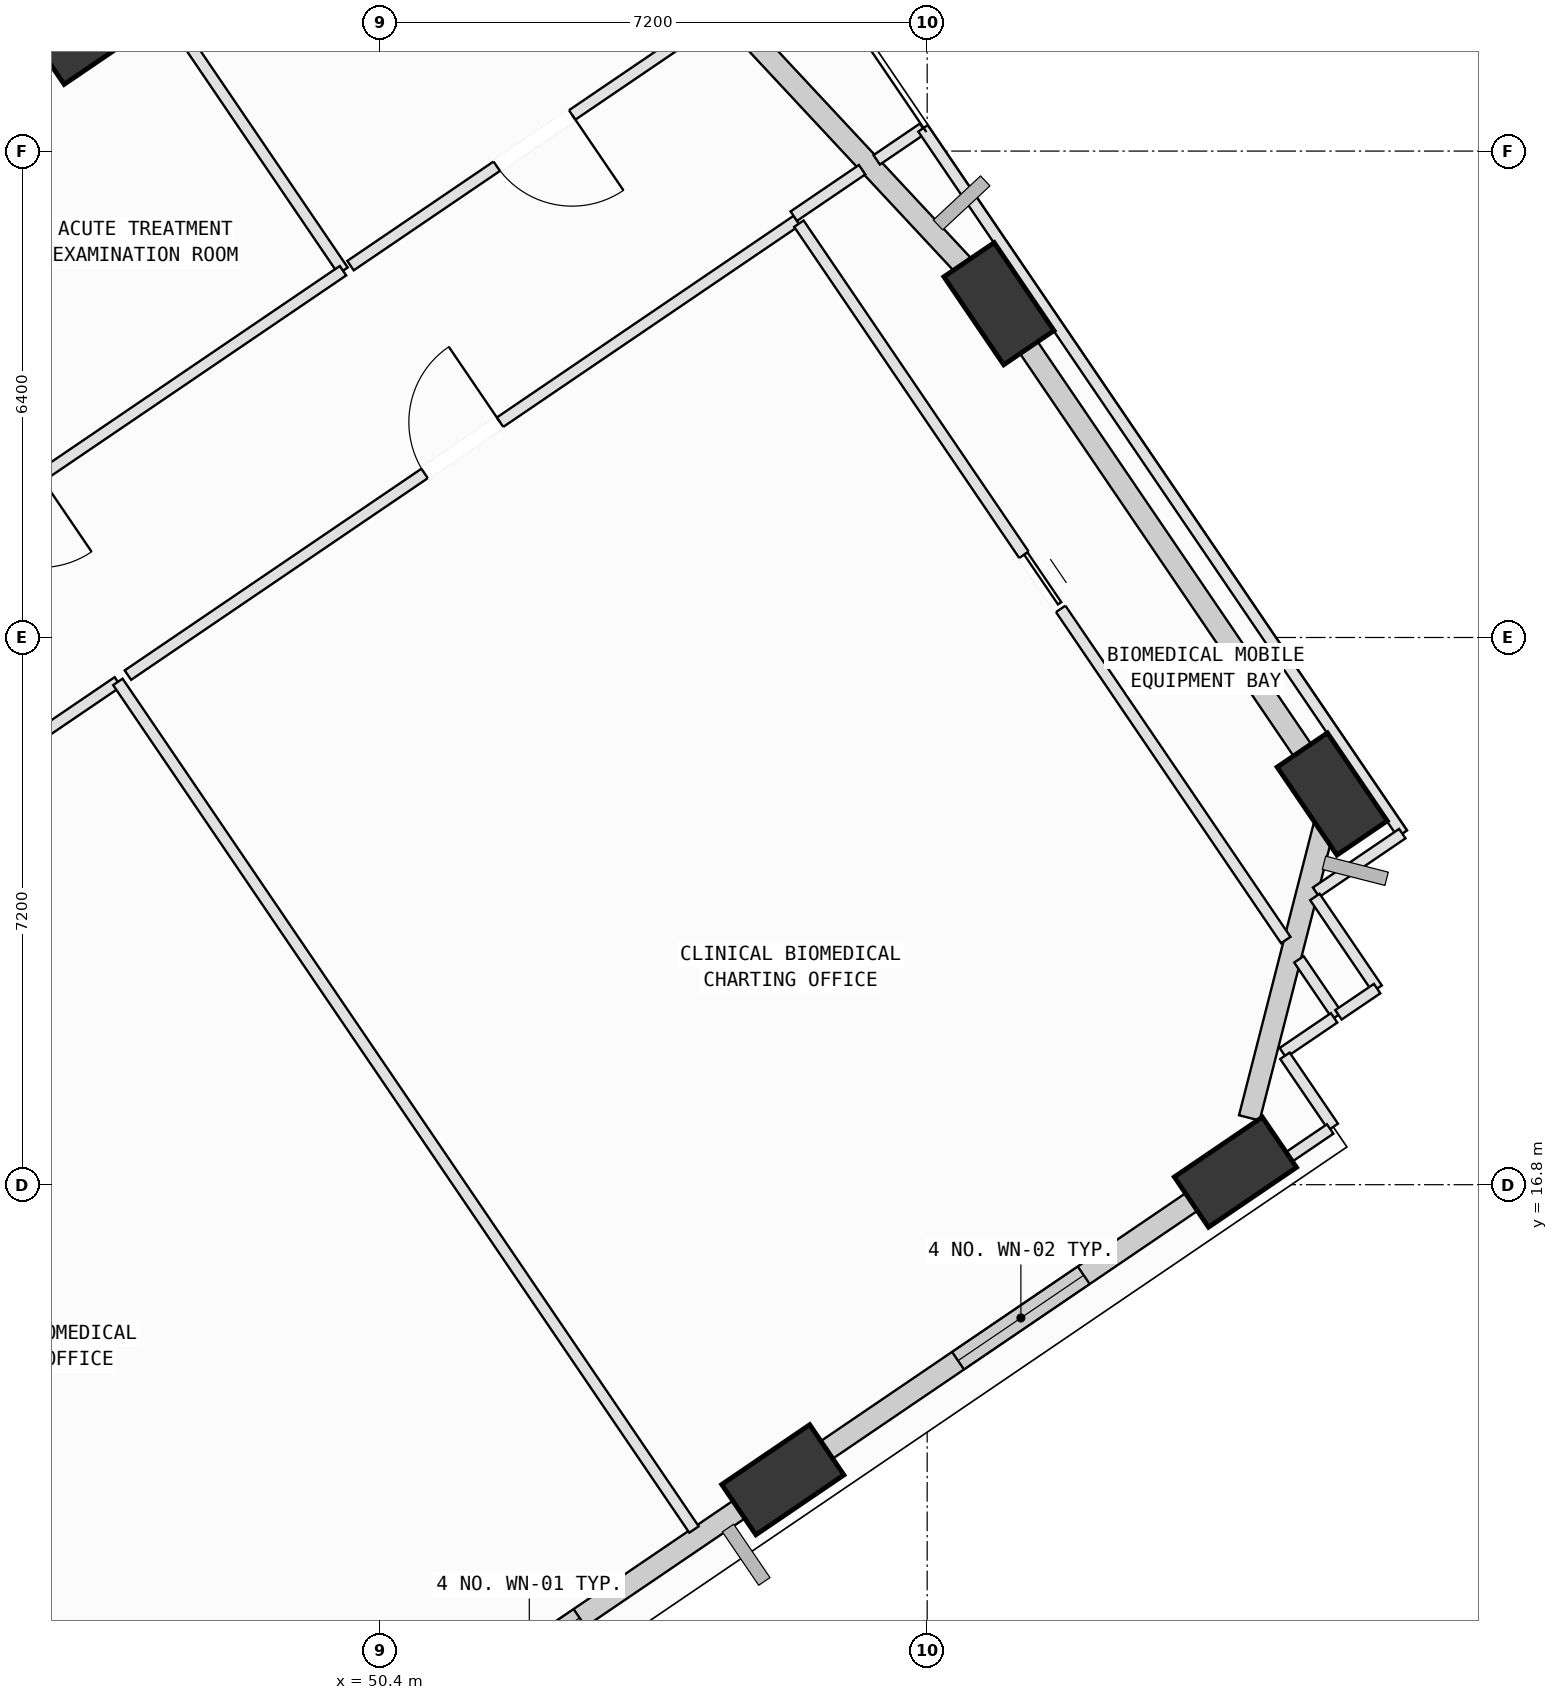
"""IFC4 building model, lengths in metres.
Left out: names, types, materials, properties, quantities, classifications, styles, units other than length and angle.
Written with IfcOpenShell. Run it as: python <this file> out.ifc"""

import sys

from ifc_helpers import new_model, si_unit, direction, frame, frame_2d, origin, origin_2d, place, context, subcontext, project, spatial, rectangle, extrude, element, fill, save


model = new_model("IFC4")
c1 = context("Model", 3, precision=1e-05, world=origin(), true_north=direction((0.0, 1.0)))
c2 = subcontext(c1, "Body", "Model", "MODEL_VIEW")
j1 = project(units=[si_unit("LENGTHUNIT", "METRE"), si_unit("PLANEANGLEUNIT", "RADIAN")], contexts=[c1])
p1 = place(None, origin())
s1 = spatial("IfcSite", under=j1, at=p1, CompositionType="ELEMENT")
p2 = place(p1, origin())
s2 = spatial("IfcBuilding", under=s1, at=p2, CompositionType="ELEMENT")
p3 = place(p2, frame((0.0, 0.0, 169.8)))
s3 = spatial("IfcBuildingStorey", under=s2, at=p3, CompositionType="ELEMENT", Elevation=169.8)
p4 = place(p3, frame((55.701, 12.918, 0.002), z_axis=(0.048185452989, 0.091509826232, 0.994637679672), x_axis=(-0.992304167362, -0.109330716198, 0.058131178649)))
e1 = element("IfcColumn", 1, at=p4, inside=s3, PredefinedType="COLUMN", context=c2, shape_type="SweptSolid", body=[
    extrude(rectangle(XDim=1.4, YDim=0.8, at=origin_2d()), origin(), (0.0, 0.0, 1.0), 4.018),
])
p5 = place(p3, frame((61.656, 16.965, 0.002), z_axis=(0.031295675445, 0.115721218507, 0.992788587911), x_axis=(-0.944079501124, -0.322759370879, 0.067381630046)))
e2 = element("IfcColumn", 2, at=p5, inside=s3, PredefinedType="COLUMN", context=c2, shape_type="SweptSolid", body=[
    extrude(rectangle(XDim=1.4, YDim=0.8, at=origin_2d()), origin(), (0.0, 0.0, 1.0), 4.025),
])
p6 = place(p3, frame((62.929, 21.941, 0.002), z_axis=(0.010733315165, 0.120795275761, 0.992619412111), x_axis=(0.487215616572, -0.867502531663, 0.10030104948)))
e3 = element("IfcColumn", 3, at=p6, inside=s3, PredefinedType="COLUMN", context=c2, shape_type="SweptSolid", body=[
    extrude(rectangle(XDim=1.4, YDim=0.8, at=origin_2d()), origin(), (0.0, 0.0, 1.0), 4.026),
])
p7 = place(p3, frame((58.544, 28.392, 0.002), z_axis=(-0.015676138323, 0.102745542265, 0.994584140348), x_axis=(0.679723744702, -0.728413429944, 0.0859622357)))
e4 = element("IfcColumn", 4, at=p7, inside=s3, PredefinedType="COLUMN", context=c2, shape_type="SweptSolid", body=[
    extrude(rectangle(XDim=1.4, YDim=0.8, at=origin_2d()), origin(), (0.0, 0.0, 1.0), 4.018),
])
p8 = place(p3, frame((46.6, 32.002, 0.002), z_axis=(-0.030243842786, 0.05353647977, 0.998107787419), x_axis=(-0.444173384938, -0.895273976304, 0.034561705191)))
e5 = element("IfcColumn", 5, at=p8, inside=s3, PredefinedType="COLUMN", context=c2, shape_type="SweptSolid", body=[
    extrude(rectangle(XDim=1.4, YDim=0.8, at=origin_2d()), origin(), (0.0, 0.0, 1.0), 4.004),
])
p9 = place(p3, frame((55.45, 12.747, 0.0), z_axis=(0.0, 0.0, 1.0), x_axis=(-0.827088583616, -0.562071592284, 0.0)))
e6 = element("IfcWall", 6, at=p9, inside=s3, PredefinedType="SOLIDWALL", context=c2, shape_type="SweptSolid", body=[
    extrude(rectangle(XDim=6.218, YDim=0.28, at=frame_2d((3.109, 0.0))), origin(), (0.0, 0.0, 1.0), 3.165),
])
p10 = place(p9, frame((2.93, 0.0, 0.75)))
e7 = element("IfcOpeningElement", 7, at=p10, cuts=e6, PredefinedType="OPENING", context=c2, shape_type="SweptSolid", body=[
    extrude(rectangle(XDim=1.6, YDim=1.95, at=frame_2d((0.8, 0.975))), frame((0.0, 0.15, 0.0), z_axis=(0.0, -1.0, 0.0), x_axis=(1.0, 0.0, 0.0)), (0.0, 0.0, 1.0), 0.3),
])
p11 = place(p3, frame((61.418, 16.803, 0.0), z_axis=(0.0, 0.0, 1.0), x_axis=(-0.827071235127, -0.562097119745, 0.0)))
e8 = element("IfcWall", 8, at=p11, inside=s3, PredefinedType="SOLIDWALL", context=c2, shape_type="SweptSolid", body=[
    extrude(rectangle(XDim=6.242, YDim=0.28, at=frame_2d((3.121, 0.0))), origin(), (0.0, 0.0, 1.0), 3.165),
])
p12 = place(p11, frame((2.125, 0.0, 0.75)))
e9 = element("IfcOpeningElement", 9, at=p12, cuts=e8, PredefinedType="OPENING", context=c2, shape_type="SweptSolid", body=[
    extrude(rectangle(XDim=2.0, YDim=1.95, at=frame_2d((1.0, 0.975))), frame((0.0, 0.15, 0.0), z_axis=(0.0, -1.0, 0.0), x_axis=(1.0, 0.0, 0.0)), (0.0, 0.0, 1.0), 0.3),
])
p13 = place(p3, frame((62.866, 21.695, 0.0), z_axis=(0.0, 0.0, 1.0), x_axis=(-0.247839677851, -0.968801060116, 0.0)))
e10 = element("IfcWall", 10, at=p13, inside=s3, PredefinedType="SOLIDWALL", context=c2, shape_type="SweptSolid", body=[
    extrude(rectangle(XDim=4.145, YDim=0.28, at=frame_2d((2.073, 0.0))), origin(), (0.0, 0.0, 1.0), 3.165),
])
p14 = place(p3, frame((58.713, 28.144, 0.0), z_axis=(0.0, 0.0, 1.0), x_axis=(0.562091314576, -0.827075180427, 0.0)))
e11 = element("IfcWall", 11, at=p14, inside=s3, PredefinedType="SOLIDWALL", context=c2, shape_type="SweptSolid", body=[
    extrude(rectangle(XDim=6.84, YDim=0.28, at=frame_2d((3.42, 0.0))), origin(), (0.0, 0.0, 1.0), 3.165),
])
p15 = place(p3, frame((52.072, 35.335, 0.0), z_axis=(0.0, 0.0, 1.0), x_axis=(0.681878154304, -0.731465776837, 0.0)))
e12 = element("IfcWall", 12, at=p15, inside=s3, PredefinedType="SOLIDWALL", context=c2, shape_type="SweptSolid", body=[
    extrude(rectangle(XDim=8.838, YDim=0.28, at=frame_2d((4.419, 0.0))), origin(), (0.0, 0.0, 1.0), 3.165),
])
p16 = place(p3, frame((44.658, 30.683, 0.0), z_axis=(0.0, 0.0, 1.0), x_axis=(0.82709578115, 0.562061000964, 0.0)))
e13 = element("IfcWall", 13, at=p16, inside=s3, PredefinedType="SOLIDWALL", context=c2, shape_type="SweptSolid", body=[
    extrude(rectangle(XDim=1.877, YDim=0.28, at=frame_2d((0.939, 0.0))), origin(), (0.0, 0.0, 1.0), 3.065),
])
p17 = place(p3, frame((41.23, 19.527, 0.0), z_axis=(0.0, 0.0, 1.0), x_axis=(0.827060374775, 0.562113099364, 0.0)))
e14 = element("IfcWall", 14, at=p17, inside=s3, PredefinedType="PARTITIONING", context=c2, shape_type="SweptSolid", body=[
    extrude(rectangle(XDim=6.918, YDim=0.15, at=frame_2d((3.459, 0.0))), origin(), (0.0, 0.0, 1.0), 3.065),
])
p18 = place(p17, frame((2.859, 0.0, 0.0)))
e15 = element("IfcOpeningElement", 15, at=p18, cuts=e14, PredefinedType="OPENING", context=c2, shape_type="SweptSolid", body=[
    extrude(rectangle(XDim=1.2, YDim=2.15, at=frame_2d((0.6, 1.075))), frame((0.0, 0.085, 0.0), z_axis=(0.0, -1.0, 0.0), x_axis=(1.0, 0.0, 0.0)), (0.0, 0.0, 1.0), 0.17),
])
p19 = place(p3, frame((46.952, 23.416, 0.0), z_axis=(0.0, 0.0, 1.0), x_axis=(0.562106478049, -0.827064874926, 0.0)))
e16 = element("IfcWall", 16, at=p19, inside=s3, PredefinedType="PARTITIONING", context=c2, shape_type="SweptSolid", body=[
    extrude(rectangle(XDim=13.485, YDim=0.15, at=frame_2d((6.743, 0.0))), origin(), (0.0, 0.0, 1.0), 3.415),
])
p20 = place(p3, frame((47.084, 23.505, 0.0), z_axis=(0.0, 0.0, 1.0), x_axis=(0.827050244117, 0.562128004734, 0.0)))
e17 = element("IfcWall", 17, at=p20, inside=s3, PredefinedType="PARTITIONING", context=c2, shape_type="SweptSolid", body=[
    extrude(rectangle(XDim=10.64, YDim=0.15, at=frame_2d((5.32, 0.0))), origin(), (0.0, 0.0, 1.0), 3.78),
])
p21 = place(p20, frame((4.72, 0.0, 0.0)))
e18 = element("IfcOpeningElement", 18, at=p21, cuts=e17, PredefinedType="OPENING", context=c2, shape_type="SweptSolid", body=[
    extrude(rectangle(XDim=1.2, YDim=2.15, at=frame_2d((0.6, 1.075))), frame((0.0, 0.085, 0.0), z_axis=(0.0, -1.0, 0.0), x_axis=(1.0, 0.0, 0.0)), (0.0, 0.0, 1.0), 0.17),
])
p22 = place(p3, frame((55.912, 29.445, 0.0), z_axis=(0.0, 0.0, 1.0), x_axis=(0.562088516887, -0.827077081767, 0.0)))
e19 = element("IfcWall", 19, at=p22, inside=s3, PredefinedType="PARTITIONING", context=c2, shape_type="SweptSolid", body=[
    extrude(rectangle(XDim=11.397, YDim=0.15, at=frame_2d((5.698, 0.0))), origin(), (0.0, 0.0, 1.0), 3.78),
])
p23 = place(p22, frame((5.268, 0.0, 0.0)))
e20 = element("IfcOpeningElement", 20, at=p23, cuts=e19, PredefinedType="OPENING", context=c2, shape_type="SweptSolid", body=[
    extrude(rectangle(XDim=0.86, YDim=2.06, at=frame_2d((0.43, 1.03))), frame((0.0, 0.085, 0.0), z_axis=(0.0, -1.0, 0.0), x_axis=(1.0, 0.0, 0.0)), (0.0, 0.0, 1.0), 0.17),
])
p24 = place(p3, frame((62.491, 19.765, 0.0), z_axis=(0.0, 0.0, 1.0), x_axis=(0.562027100448, -0.82711881756, 0.0)))
e21 = element("IfcWall", 21, at=p24, inside=s3, PredefinedType="PARTITIONING", context=c2, shape_type="SweptSolid", body=[
    extrude(rectangle(XDim=0.897, YDim=0.15, at=frame_2d((0.448, 0.0))), origin(), (0.0, 0.0, 1.0), 3.78),
])
p25 = place(p3, frame((62.954, 18.995, 0.0), z_axis=(0.0, 0.0, 1.0), x_axis=(-0.82751053639, -0.561450186716, 0.0)))
e22 = element("IfcWall", 22, at=p25, inside=s3, PredefinedType="PARTITIONING", context=c2, shape_type="SweptSolid", body=[
    extrude(rectangle(XDim=0.816, YDim=0.15, at=frame_2d((0.408, 0.0))), origin(), (0.0, 0.0, 1.0), 3.78),
])
p26 = place(p3, frame((62.307, 18.496, 0.0), z_axis=(0.0, 0.0, 1.0), x_axis=(0.562546175455, -0.826765867994, 0.0)))
e23 = element("IfcWall", 23, at=p26, inside=s3, PredefinedType="PARTITIONING", context=c2, shape_type="SweptSolid", body=[
    extrude(rectangle(XDim=1.131, YDim=0.15, at=frame_2d((0.565, 0.0))), origin(), (0.0, 0.0, 1.0), 3.78),
])
p27 = place(p3, frame((62.902, 17.533, 0.0), z_axis=(0.0, 0.0, 1.0), x_axis=(-0.827342173248, -0.561698253838, 0.0)))
e24 = element("IfcWall", 24, at=p27, inside=s3, PredefinedType="PARTITIONING", context=c2, shape_type="SweptSolid", body=[
    extrude(rectangle(XDim=1.638, YDim=0.15, at=frame_2d((0.819, 0.0))), origin(), (0.0, 0.0, 1.0), 3.78),
])
p28 = place(p3, frame((56.384, 13.104, 0.0), z_axis=(0.0, 0.0, 1.0), x_axis=(-0.827038460585, -0.562145341271, 0.0)))
e25 = element("IfcWall", 25, at=p28, inside=s3, PredefinedType="PARTITIONING", context=c2, shape_type="SweptSolid", body=[
    extrude(rectangle(XDim=0.973, YDim=0.15, at=frame_2d((0.487, 0.0))), origin(), (0.0, 0.0, 1.0), 3.165),
])
p29 = place(p3, frame((47.455, 32.445, 0.0), z_axis=(0.0, 0.0, 1.0), x_axis=(0.561992532426, -0.827142305469, 0.0)))
e26 = element("IfcWall", 26, at=p29, inside=s3, PredefinedType="PARTITIONING", context=c2, shape_type="SweptSolid", body=[
    extrude(rectangle(XDim=4.375, YDim=0.15, at=frame_2d((2.188, 0.0))), origin(), (0.0, 0.0, 1.0), 3.78),
])
p30 = place(p3, frame((49.914, 28.826, 0.0), z_axis=(0.0, 0.0, 1.0), x_axis=(-0.827105946098, -0.562046042535, 0.0)))
e27 = element("IfcWall", 27, at=p30, inside=s3, PredefinedType="PARTITIONING", context=c2, shape_type="SweptSolid", body=[
    extrude(rectangle(XDim=10.828, YDim=0.15, at=frame_2d((5.414, 0.0))), origin(), (0.0, 0.0, 1.0), 3.78),
])
p31 = place(p30, frame((4.814, 0.0, 0.0)))
e28 = element("IfcOpeningElement", 28, at=p31, cuts=e27, PredefinedType="OPENING", context=c2, shape_type="SweptSolid", body=[
    extrude(rectangle(XDim=1.2, YDim=2.15, at=frame_2d((0.6, 1.075))), frame((0.0, 0.085, 0.0), z_axis=(0.0, -1.0, 0.0), x_axis=(1.0, 0.0, 0.0)), (0.0, 0.0, 1.0), 0.17),
])
p32 = place(p3, frame((54.853, 32.183, 0.0), z_axis=(0.0, 0.0, 1.0), x_axis=(-0.82702347763, -0.562167383836, 0.0)))
e29 = element("IfcWall", 29, at=p32, inside=s3, PredefinedType="PARTITIONING", context=c2, shape_type="SweptSolid", body=[
    extrude(rectangle(XDim=5.853, YDim=0.15, at=frame_2d((2.926, 0.0))), origin(), (0.0, 0.0, 1.0), 3.78),
])
p33 = place(p32, frame((2.326, 0.0, 0.0)))
e30 = element("IfcOpeningElement", 30, at=p33, cuts=e29, PredefinedType="OPENING", context=c2, shape_type="SweptSolid", body=[
    extrude(rectangle(XDim=1.2, YDim=2.15, at=frame_2d((0.6, 1.075))), frame((0.0, 0.085, 0.0), z_axis=(0.0, -1.0, 0.0), x_axis=(1.0, 0.0, 0.0)), (0.0, 0.0, 1.0), 0.17),
])
p34 = place(p3, frame((55.845, 29.544, 0.0), z_axis=(0.0, 0.0, 1.0), x_axis=(0.827005868355, 0.562193288564, 0.0)))
e31 = element("IfcWall", 31, at=p34, inside=s3, PredefinedType="PARTITIONING", context=c2, shape_type="SweptSolid", body=[
    extrude(rectangle(XDim=1.087, YDim=0.15, at=frame_2d((0.543, 0.0))), origin(), (0.0, 0.0, 1.0), 3.78),
])
p35 = place(p3, frame((56.936, 30.285, 0.0), z_axis=(0.0, 0.0, 1.0), x_axis=(0.826914168076, 0.562328159205, 0.0)))
e32 = element("IfcWall", 32, at=p35, inside=s3, PredefinedType="PARTITIONING", context=c2, shape_type="SweptSolid", body=[
    extrude(rectangle(XDim=0.736, YDim=0.15, at=frame_2d((0.368, 0.0))), origin(), (0.0, 0.0, 1.0), 3.78),
])
p36 = place(p3, frame((57.545, 30.699, 0.0), z_axis=(0.0, 0.0, 1.0), x_axis=(0.562049902356, -0.827103323208, 0.0)))
e33 = element("IfcWall", 33, at=p36, inside=s3, PredefinedType="PARTITIONING", context=c2, shape_type="SweptSolid", body=[
    extrude(rectangle(XDim=11.22, YDim=0.15, at=frame_2d((5.61, 0.0))), origin(), (0.0, 0.0, 1.0), 3.165),
])
p37 = place(p3, frame((63.851, 21.419, 0.0), z_axis=(0.0, 0.0, 1.0), x_axis=(-0.826976169656, -0.562236973901, 0.0)))
e34 = element("IfcWall", 34, at=p37, inside=s3, PredefinedType="PARTITIONING", context=c2, shape_type="SweptSolid", body=[
    extrude(rectangle(XDim=1.371, YDim=0.15, at=frame_2d((0.686, 0.0))), origin(), (0.0, 0.0, 1.0), 3.78),
])
p38 = place(p3, frame((62.701, 20.586, 0.0), z_axis=(0.0, 0.0, 1.0), x_axis=(0.561828982065, -0.827253404292, 0.0)))
e35 = element("IfcWall", 35, at=p38, inside=s3, PredefinedType="PARTITIONING", context=c2, shape_type="SweptSolid", body=[
    extrude(rectangle(XDim=1.458, YDim=0.15, at=frame_2d((0.729, 0.0))), origin(), (0.0, 0.0, 1.0), 3.78),
])
p39 = place(p3, frame((63.52, 19.38, 0.0), z_axis=(0.0, 0.0, 1.0), x_axis=(-0.827811629702, -0.561006154805, 0.0)))
e36 = element("IfcWall", 36, at=p39, inside=s3, PredefinedType="PARTITIONING", context=c2, shape_type="SweptSolid", body=[
    extrude(rectangle(XDim=0.615, YDim=0.15, at=frame_2d((0.308, 0.0))), origin(), (0.0, 0.0, 1.0), 3.78),
])
p40 = place(p10, origin())
e37 = element("IfcWindow", 37, at=p40, inside=s3, PartitioningType="SINGLE_PANEL", PredefinedType="WINDOW", context=c2, shape_type="SweptSolid", body=[
    extrude(rectangle(XDim=1.6, YDim=1.95, at=frame_2d((0.8, 0.975))), frame((0.0, 0.03, 0.0), z_axis=(0.0, -1.0, 0.0), x_axis=(1.0, 0.0, 0.0)), (0.0, 0.0, 1.0), 0.06),
])
fill(e7, e37)
p41 = place(p12, origin())
e38 = element("IfcWindow", 38, at=p41, inside=s3, PartitioningType="SINGLE_PANEL", PredefinedType="WINDOW", context=c2, shape_type="SweptSolid", body=[
    extrude(rectangle(XDim=2.0, YDim=1.95, at=frame_2d((1.0, 0.975))), frame((0.0, 0.03, 0.0), z_axis=(0.0, -1.0, 0.0), x_axis=(1.0, 0.0, 0.0)), (0.0, 0.0, 1.0), 0.06),
])
fill(e9, e38)
p42 = place(p21, origin())
e39 = element("IfcDoor", 39, at=p42, inside=s3, OperationType="SINGLE_SWING_RIGHT", PredefinedType="DOOR", context=c2, shape_type="SweptSolid", body=[
    extrude(rectangle(XDim=1.2, YDim=2.15, at=frame_2d((0.6, 1.075))), frame((0.0, 0.025, 0.0), z_axis=(0.0, -1.0, 0.0), x_axis=(1.0, 0.0, 0.0)), (0.0, 0.0, 1.0), 0.05),
])
fill(e18, e39)
p43 = place(p33, origin())
e40 = element("IfcDoor", 40, at=p43, inside=s3, OperationType="SINGLE_SWING_LEFT", PredefinedType="DOOR", context=c2, shape_type="SweptSolid", body=[
    extrude(rectangle(XDim=1.2, YDim=2.15, at=frame_2d((0.6, 1.075))), frame((0.0, 0.025, 0.0), z_axis=(0.0, -1.0, 0.0), x_axis=(1.0, 0.0, 0.0)), (0.0, 0.0, 1.0), 0.05),
])
fill(e30, e40)
p44 = place(p23, origin())
e41 = element("IfcDoor", 41, at=p44, inside=s3, OperationType="SLIDING_TO_LEFT", PredefinedType="DOOR", context=c2, shape_type="SweptSolid", body=[
    extrude(rectangle(XDim=0.86, YDim=2.06, at=frame_2d((0.43, 1.03))), frame((0.0, 0.025, 0.0), z_axis=(0.0, -1.0, 0.0), x_axis=(1.0, 0.0, 0.0)), (0.0, 0.0, 1.0), 0.05),
])
fill(e20, e41)
save(model, sys.argv[1])
